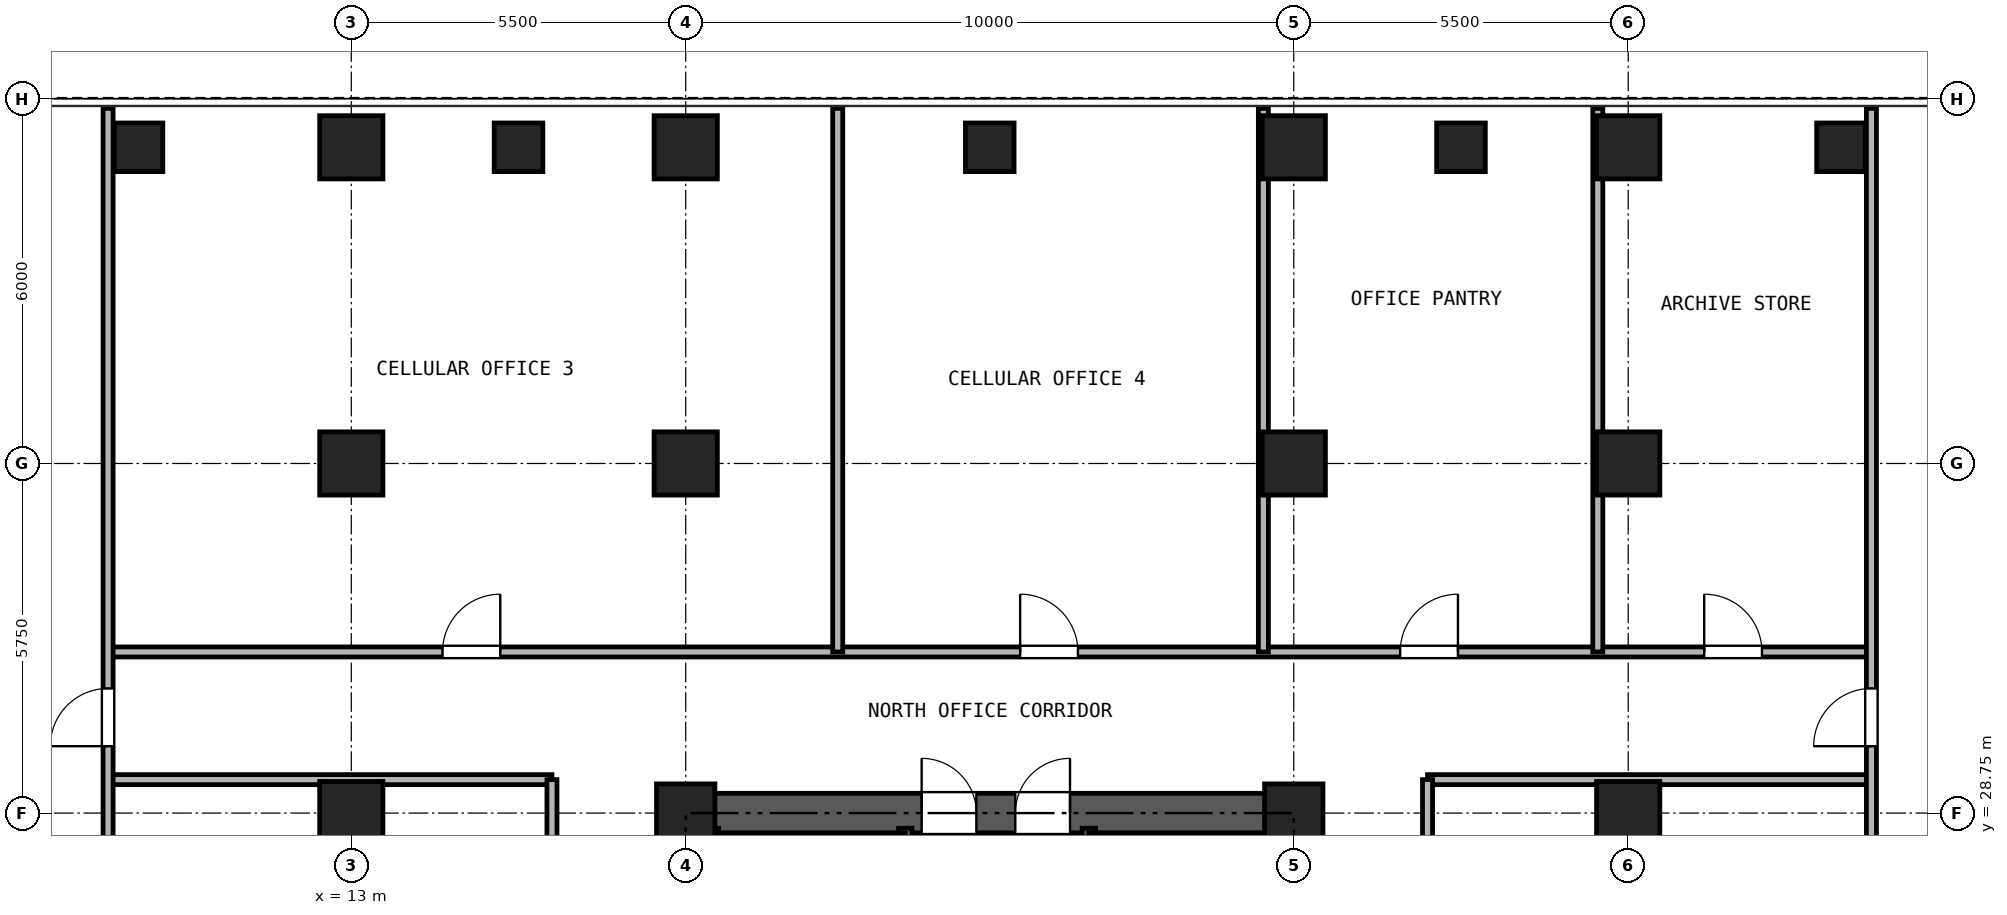
"""IFC4 building model, lengths in metres.
Left out: names, types, materials, properties, quantities, classifications, styles, units other than length and angle.
Written with IfcOpenShell. Run it as: python <this file> out.ifc"""

import sys

from ifc_helpers import new_model, si_unit, direction, frame, frame_2d, origin, origin_2d, place, context, subcontext, project, spatial, rectangle, hollow_rectangle, extrude, source, transform, mapped, element, fill, save


model = new_model("IFC4")
c1 = context("Model", 3, precision=1e-05, world=origin(), true_north=direction((0.0, 1.0)))
c2 = subcontext(c1, "Body", "Model", "MODEL_VIEW")
j1 = project(units=[si_unit("LENGTHUNIT", "METRE"), si_unit("PLANEANGLEUNIT", "RADIAN")], contexts=[c1])
p1 = place(None, origin())
s1 = spatial("IfcSite", under=j1, at=p1, CompositionType="ELEMENT")
p2 = place(p1, origin())
s2 = spatial("IfcBuilding", under=s1, at=p2, CompositionType="ELEMENT")
p3 = place(p2, frame((0.0, 0.0, 51.3)))
s3 = spatial("IfcBuildingStorey", under=s2, at=p3, CompositionType="ELEMENT", Elevation=51.3)
m1 = source(origin(), c2, "Body", "SweptSolid", [
    extrude(hollow_rectangle(XDim=1.04, YDim=1.04, WallThickness=0.065, at=origin_2d()), origin(), (0.0, 0.0, 1.0), 3.32),
])
for number, where, z_axis, x_axis in (
    (1, (13.0, 39.7, 0.0), (0.0, 0.0, 1.0), (1.0, 0.0, 0.0)),
    (2, (18.5, 39.7, 0.0), (0.0, 0.0, 1.0), (1.0, 0.0, 0.0)),
    (3, (28.5, 39.7, 0.0), (0.0, 0.0, 1.0), (1.0, 0.0, 0.0)),
    (4, (34.0, 39.7, 0.0), (0.0, 0.0, 1.0), (1.0, 0.0, 0.0)),
    (5, (13.0, 28.75, 0.0), (0.0, 0.0, 1.0), (1.0, 0.0, 0.0)),
    (6, (13.0, 34.5, 0.0), (0.0, 0.0, 1.0), (1.0, 0.0, 0.0)),
):
    element("IfcColumn", number, at=place(p3, frame(where, z_axis=z_axis, x_axis=x_axis)), inside=s3, PredefinedType="COLUMN", context=c2, shape_type="MappedRepresentation", body=[
        mapped(m1, transform((0.0, 0.0, 0.0), x_axis=(1.0, 0.0, 0.0), y_axis=(0.0, 1.0, 0.0), z_axis=(0.0, 0.0, 1.0), scale=1.0)),
    ])
m2 = source(origin(), c2, "Body", "SweptSolid", [
    extrude(hollow_rectangle(XDim=0.96, YDim=0.96, WallThickness=0.06, at=origin_2d()), origin(), (0.0, 0.0, 1.0), 3.32),
])
p4 = place(p3, frame((18.5, 28.75, 0.0), z_axis=(0.0, 0.0, 1.0), x_axis=(1.0, 0.0, 0.0)))
e7 = element("IfcColumn", 7, at=p4, inside=s3, PredefinedType="COLUMN", context=c2, shape_type="MappedRepresentation", body=[
    mapped(m2, transform((0.0, 0.0, 0.0), x_axis=(1.0, 0.0, 0.0), y_axis=(0.0, 1.0, 0.0), z_axis=(0.0, 0.0, 1.0), scale=1.0)),
])
p5 = place(p3, frame((18.5, 34.5, 0.0), z_axis=(0.0, 0.0, 1.0), x_axis=(1.0, 0.0, 0.0)))
e8 = element("IfcColumn", 8, at=p5, inside=s3, PredefinedType="COLUMN", context=c2, shape_type="MappedRepresentation", body=[
    mapped(m1, transform((0.0, 0.0, 0.0), x_axis=(1.0, 0.0, 0.0), y_axis=(0.0, 1.0, 0.0), z_axis=(0.0, 0.0, 1.0), scale=1.0)),
])
p6 = place(p3, frame((28.5, 28.75, 0.0), z_axis=(0.0, 0.0, 1.0), x_axis=(1.0, 0.0, 0.0)))
e9 = element("IfcColumn", 9, at=p6, inside=s3, PredefinedType="COLUMN", context=c2, shape_type="MappedRepresentation", body=[
    mapped(m2, transform((0.0, 0.0, 0.0), x_axis=(1.0, 0.0, 0.0), y_axis=(0.0, 1.0, 0.0), z_axis=(0.0, 0.0, 1.0), scale=1.0)),
])
for number, where, z_axis, x_axis in (
    (10, (28.5, 34.5, 0.0), (0.0, 0.0, 1.0), (1.0, 0.0, 0.0)),
    (11, (34.0, 28.75, 0.0), (0.0, 0.0, 1.0), (1.0, 0.0, 0.0)),
    (12, (34.0, 34.5, 0.0), (0.0, 0.0, 1.0), (1.0, 0.0, 0.0)),
):
    element("IfcColumn", number, at=place(p3, frame(where, z_axis=z_axis, x_axis=x_axis)), inside=s3, PredefinedType="COLUMN", context=c2, shape_type="MappedRepresentation", body=[
        mapped(m1, transform((0.0, 0.0, 0.0), x_axis=(1.0, 0.0, 0.0), y_axis=(0.0, 1.0, 0.0), z_axis=(0.0, 0.0, 1.0), scale=1.0)),
    ])
m3 = source(origin(), c2, "Body", "SweptSolid", [
    extrude(hollow_rectangle(XDim=0.8, YDim=0.8, WallThickness=0.045, at=origin_2d()), origin(), (0.0, 0.0, 1.0), 3.32),
])
for number, where, z_axis, x_axis in (
    (13, (9.5, 39.7, 0.0), (0.0, 0.0, 1.0), (1.0, 0.0, 0.0)),
    (14, (15.75, 39.7, 0.0), (0.0, 0.0, 1.0), (1.0, 0.0, 0.0)),
    (15, (23.5, 39.7, 0.0), (0.0, 0.0, 1.0), (1.0, 0.0, 0.0)),
    (16, (31.25, 39.7, 0.0), (0.0, 0.0, 1.0), (1.0, 0.0, 0.0)),
    (17, (37.5, 39.7, 0.0), (0.0, 0.0, 1.0), (1.0, 0.0, 0.0)),
):
    element("IfcColumn", number, at=place(p3, frame(where, z_axis=z_axis, x_axis=x_axis)), inside=s3, PredefinedType="COLUMN", context=c2, shape_type="MappedRepresentation", body=[
        mapped(m3, transform((0.0, 0.0, 0.0), x_axis=(1.0, 0.0, 0.0), y_axis=(0.0, 1.0, 0.0), z_axis=(0.0, 0.0, 1.0), scale=1.0)),
    ])
p7 = place(p3, frame((18.175, 28.75, 0.0), z_axis=(0.0, 0.0, 1.0), x_axis=(1.0, 0.0, 0.0)))
e18 = element("IfcWall", 18, at=p7, inside=s3, PredefinedType="SHEAR", context=c2, shape_type="SweptSolid", body=[
    extrude(rectangle(XDim=10.65, YDim=0.65, at=frame_2d((5.325, 0.0))), origin(), (0.0, 0.0, 1.0), 3.32),
])
p8 = place(p7, frame((4.205, 0.0, 0.0)))
e19 = element("IfcOpeningElement", 19, at=p8, cuts=e18, PredefinedType="OPENING", context=c2, shape_type="SweptSolid", body=[
    extrude(rectangle(XDim=0.9, YDim=2.05, at=frame_2d((0.45, 1.025))), frame((0.0, 0.335, 0.0), z_axis=(0.0, -1.0, 0.0), x_axis=(1.0, 0.0, 0.0)), (0.0, 0.0, 1.0), 0.67),
])
p9 = place(p7, frame((5.745, 0.0, 0.0)))
e20 = element("IfcOpeningElement", 20, at=p9, cuts=e18, PredefinedType="OPENING", context=c2, shape_type="SweptSolid", body=[
    extrude(rectangle(XDim=0.9, YDim=2.05, at=frame_2d((0.45, 1.025))), frame((0.0, 0.335, 0.0), z_axis=(0.0, -1.0, 0.0), x_axis=(1.0, 0.0, 0.0)), (0.0, 0.0, 1.0), 0.67),
])
p10 = place(p3, frame((18.5, 11.825, 0.0), z_axis=(0.0, 0.0, 1.0), x_axis=(0.0, 1.0, 0.0)))
e21 = element("IfcWall", 21, at=p10, inside=s3, PredefinedType="SHEAR", context=c2, shape_type="SweptSolid", body=[
    extrude(rectangle(XDim=16.6, YDim=0.65, at=frame_2d((8.3, 0.0))), origin(), (0.0, 0.0, 1.0), 3.32),
])
p11 = place(p10, frame((7.325, 0.0, 0.0)))
e22 = element("IfcOpeningElement", 22, at=p11, cuts=e21, PredefinedType="OPENING", context=c2, shape_type="SweptSolid", body=[
    extrude(rectangle(XDim=1.15, YDim=2.2, at=frame_2d((0.575, 1.1))), frame((0.0, 0.335, 0.0), z_axis=(0.0, -1.0, 0.0), x_axis=(1.0, 0.0, 0.0)), (0.0, 0.0, 1.0), 0.67),
])
p12 = place(p3, frame((28.5, 11.825, 0.0), z_axis=(0.0, 0.0, 1.0), x_axis=(0.0, 1.0, 0.0)))
e23 = element("IfcWall", 23, at=p12, inside=s3, PredefinedType="SHEAR", context=c2, shape_type="SweptSolid", body=[
    extrude(rectangle(XDim=16.6, YDim=0.65, at=frame_2d((8.3, 0.0))), origin(), (0.0, 0.0, 1.0), 3.32),
])
p13 = place(p12, frame((7.325, 0.0, 0.0)))
e24 = element("IfcOpeningElement", 24, at=p13, cuts=e23, PredefinedType="OPENING", context=c2, shape_type="SweptSolid", body=[
    extrude(rectangle(XDim=1.15, YDim=2.2, at=frame_2d((0.575, 1.1))), frame((0.0, 0.335, 0.0), z_axis=(0.0, -1.0, 0.0), x_axis=(1.0, 0.0, 0.0)), (0.0, 0.0, 1.0), 0.67),
])
for number, where, z_axis, x_axis in (
    (25, (18.93, 21.39, 0.0), (0.0, 0.0, 1.0), (0.0, 1.0, 0.0)),
    (26, (22.11, 21.39, 0.0), (0.0, 0.0, 1.0), (0.0, 1.0, 0.0)),
    (27, (25.13, 21.39, 0.0), (0.0, 0.0, 1.0), (0.0, 1.0, 0.0)),
):
    element("IfcWall", number, at=place(p3, frame(where, z_axis=z_axis, x_axis=x_axis)), inside=s3, PredefinedType="SOLIDWALL", context=c2, shape_type="SweptSolid", body=[
        extrude(rectangle(XDim=7.11, YDim=0.22, at=frame_2d((3.555, 0.0))), origin(), (0.0, 0.0, 1.0), 3.32),
    ])
p14 = place(p3, frame((18.835, 28.335, 0.0), z_axis=(0.0, 0.0, 1.0), x_axis=(1.0, 0.0, 0.0)))
e28 = element("IfcWall", 28, at=p14, inside=s3, PredefinedType="PARTITIONING", context=c2, shape_type="SweptSolid", body=[
    extrude(rectangle(XDim=3.275, YDim=0.165, at=frame_2d((1.638, 0.0))), origin(), (0.0, 0.0, 1.0), 3.32),
])
p15 = place(p3, frame((25.13, 28.335, 0.0), z_axis=(0.0, 0.0, 1.0), x_axis=(1.0, 0.0, 0.0)))
e29 = element("IfcWall", 29, at=p15, inside=s3, PredefinedType="PARTITIONING", context=c2, shape_type="SweptSolid", body=[
    extrude(rectangle(XDim=3.035, YDim=0.165, at=frame_2d((1.518, 0.0))), origin(), (0.0, 0.0, 1.0), 3.32),
])
p16 = place(p3, frame((23.62, 24.4, 0.0), z_axis=(0.0, 0.0, 1.0), x_axis=(0.0, 1.0, 0.0)))
e30 = element("IfcWall", 30, at=p16, inside=s3, PredefinedType="PARTITIONING", context=c2, shape_type="SweptSolid", body=[
    extrude(rectangle(XDim=4.015, YDim=0.165, at=frame_2d((2.008, 0.0))), origin(), (0.0, 0.0, 1.0), 3.32),
])
p17 = place(p3, frame((9.0, 31.4, 0.0), z_axis=(0.0, 0.0, 1.0), x_axis=(1.0, 0.0, 0.0)))
e31 = element("IfcWall", 31, at=p17, inside=s3, PredefinedType="PARTITIONING", context=c2, shape_type="SweptSolid", body=[
    extrude(rectangle(XDim=29.0, YDim=0.165, at=frame_2d((14.5, 0.0))), origin(), (0.0, 0.0, 1.0), 2.898),
])
p18 = place(p17, frame((5.5, 0.0, 0.0)))
e32 = element("IfcOpeningElement", 32, at=p18, cuts=e31, PredefinedType="OPENING", context=c2, shape_type="SweptSolid", body=[
    extrude(rectangle(XDim=0.95, YDim=2.15, at=frame_2d((0.475, 1.075))), frame((0.0, 0.093, 0.0), z_axis=(0.0, -1.0, 0.0), x_axis=(1.0, 0.0, 0.0)), (0.0, 0.0, 1.0), 0.185),
])
p19 = place(p17, frame((15.0, 0.0, 0.0)))
e33 = element("IfcOpeningElement", 33, at=p19, cuts=e31, PredefinedType="OPENING", context=c2, shape_type="SweptSolid", body=[
    extrude(rectangle(XDim=0.95, YDim=2.15, at=frame_2d((0.475, 1.075))), frame((0.0, 0.093, 0.0), z_axis=(0.0, -1.0, 0.0), x_axis=(1.0, 0.0, 0.0)), (0.0, 0.0, 1.0), 0.185),
])
p20 = place(p17, frame((21.25, 0.0, 0.0)))
e34 = element("IfcOpeningElement", 34, at=p20, cuts=e31, PredefinedType="OPENING", context=c2, shape_type="SweptSolid", body=[
    extrude(rectangle(XDim=0.95, YDim=2.15, at=frame_2d((0.475, 1.075))), frame((0.0, 0.093, 0.0), z_axis=(0.0, -1.0, 0.0), x_axis=(1.0, 0.0, 0.0)), (0.0, 0.0, 1.0), 0.185),
])
p21 = place(p17, frame((26.25, 0.0, 0.0)))
e35 = element("IfcOpeningElement", 35, at=p21, cuts=e31, PredefinedType="OPENING", context=c2, shape_type="SweptSolid", body=[
    extrude(rectangle(XDim=0.95, YDim=2.15, at=frame_2d((0.475, 1.075))), frame((0.0, 0.093, 0.0), z_axis=(0.0, -1.0, 0.0), x_axis=(1.0, 0.0, 0.0)), (0.0, 0.0, 1.0), 0.185),
])
for number, where, z_axis, x_axis in (
    (36, (9.0, 29.3, 0.0), (0.0, 0.0, 1.0), (1.0, 0.0, 0.0)),
    (37, (30.7, 29.3, 0.0), (0.0, 0.0, 1.0), (1.0, 0.0, 0.0)),
):
    element("IfcWall", number, at=place(p3, frame(where, z_axis=z_axis, x_axis=x_axis)), inside=s3, PredefinedType="PARTITIONING", context=c2, shape_type="SweptSolid", body=[
        extrude(rectangle(XDim=7.3, YDim=0.165, at=frame_2d((3.65, 0.0))), origin(), (0.0, 0.0, 1.0), 3.32),
    ])
p22 = place(p3, frame((16.3, 11.05, 0.0), z_axis=(0.0, 0.0, 1.0), x_axis=(0.0, 1.0, 0.0)))
e38 = element("IfcWall", 38, at=p22, inside=s3, PredefinedType="PARTITIONING", context=c2, shape_type="SweptSolid", body=[
    extrude(rectangle(XDim=18.25, YDim=0.165, at=frame_2d((9.125, 0.0))), origin(), (0.0, 0.0, 1.0), 3.32),
])
p23 = place(p22, frame((5.409, 0.0, 0.0)))
e39 = element("IfcOpeningElement", 39, at=p23, cuts=e38, PredefinedType="OPENING", context=c2, shape_type="SweptSolid", body=[
    extrude(rectangle(XDim=0.95, YDim=2.15, at=frame_2d((0.475, 1.075))), frame((0.0, 0.093, 0.0), z_axis=(0.0, -1.0, 0.0), x_axis=(1.0, 0.0, 0.0)), (0.0, 0.0, 1.0), 0.185),
])
p24 = place(p22, frame((14.534, 0.0, 0.0)))
e40 = element("IfcOpeningElement", 40, at=p24, cuts=e38, PredefinedType="OPENING", context=c2, shape_type="SweptSolid", body=[
    extrude(rectangle(XDim=0.95, YDim=2.15, at=frame_2d((0.475, 1.075))), frame((0.0, 0.093, 0.0), z_axis=(0.0, -1.0, 0.0), x_axis=(1.0, 0.0, 0.0)), (0.0, 0.0, 1.0), 0.185),
])
p25 = place(p3, frame((30.7, 11.05, 0.0), z_axis=(0.0, 0.0, 1.0), x_axis=(0.0, 1.0, 0.0)))
e41 = element("IfcWall", 41, at=p25, inside=s3, PredefinedType="PARTITIONING", context=c2, shape_type="SweptSolid", body=[
    extrude(rectangle(XDim=18.25, YDim=0.165, at=frame_2d((9.125, 0.0))), origin(), (0.0, 0.0, 1.0), 3.32),
])
p26 = place(p25, frame((8.625, 0.0, 0.0)))
e42 = element("IfcOpeningElement", 42, at=p26, cuts=e41, PredefinedType="OPENING", context=c2, shape_type="SweptSolid", body=[
    extrude(rectangle(XDim=0.95, YDim=2.15, at=frame_2d((0.475, 1.075))), frame((0.0, 0.093, 0.0), z_axis=(0.0, -1.0, 0.0), x_axis=(1.0, 0.0, 0.0)), (0.0, 0.0, 1.0), 0.185),
])
p27 = place(p3, frame((9.0, 0.16, 0.0), z_axis=(0.0, 0.0, 1.0), x_axis=(0.0, 1.0, 0.0)))
e43 = element("IfcWall", 43, at=p27, inside=s3, PredefinedType="PARTITIONING", context=c2, shape_type="SweptSolid", body=[
    extrude(rectangle(XDim=40.18, YDim=0.165, at=frame_2d((20.09, 0.0))), origin(), (0.0, 0.0, 1.0), 3.32),
])
p28 = place(p27, frame((9.34, 0.0, 0.0)))
e44 = element("IfcOpeningElement", 44, at=p28, cuts=e43, PredefinedType="OPENING", context=c2, shape_type="SweptSolid", body=[
    extrude(rectangle(XDim=0.95, YDim=2.15, at=frame_2d((0.475, 1.075))), frame((0.0, 0.093, 0.0), z_axis=(0.0, -1.0, 0.0), x_axis=(1.0, 0.0, 0.0)), (0.0, 0.0, 1.0), 0.185),
])
p29 = place(p27, frame((29.69, 0.0, 0.0)))
e45 = element("IfcOpeningElement", 45, at=p29, cuts=e43, PredefinedType="OPENING", context=c2, shape_type="SweptSolid", body=[
    extrude(rectangle(XDim=0.95, YDim=2.15, at=frame_2d((0.475, 1.075))), frame((0.0, 0.093, 0.0), z_axis=(0.0, -1.0, 0.0), x_axis=(1.0, 0.0, 0.0)), (0.0, 0.0, 1.0), 0.185),
])
p30 = place(p3, frame((38.0, 0.16, 0.0), z_axis=(0.0, 0.0, 1.0), x_axis=(0.0, 1.0, 0.0)))
e46 = element("IfcWall", 46, at=p30, inside=s3, PredefinedType="PARTITIONING", context=c2, shape_type="SweptSolid", body=[
    extrude(rectangle(XDim=40.18, YDim=0.165, at=frame_2d((20.09, 0.0))), origin(), (0.0, 0.0, 1.0), 3.32),
])
p31 = place(p30, frame((9.34, 0.0, 0.0)))
e47 = element("IfcOpeningElement", 47, at=p31, cuts=e46, PredefinedType="OPENING", context=c2, shape_type="SweptSolid", body=[
    extrude(rectangle(XDim=0.95, YDim=2.15, at=frame_2d((0.475, 1.075))), frame((0.0, 0.093, 0.0), z_axis=(0.0, -1.0, 0.0), x_axis=(1.0, 0.0, 0.0)), (0.0, 0.0, 1.0), 0.185),
])
p32 = place(p30, frame((29.69, 0.0, 0.0)))
e48 = element("IfcOpeningElement", 48, at=p32, cuts=e46, PredefinedType="OPENING", context=c2, shape_type="SweptSolid", body=[
    extrude(rectangle(XDim=0.95, YDim=2.15, at=frame_2d((0.475, 1.075))), frame((0.0, 0.093, 0.0), z_axis=(0.0, -1.0, 0.0), x_axis=(1.0, 0.0, 0.0)), (0.0, 0.0, 1.0), 0.185),
])
for number, where, z_axis, x_axis in (
    (49, (21.0, 31.4, 0.0), (0.0, 0.0, 1.0), (0.0, 1.0, 0.0)),
    (50, (28.0, 31.4, 0.0), (0.0, 0.0, 1.0), (0.0, 1.0, 0.0)),
    (51, (33.5, 31.4, 0.0), (0.0, 0.0, 1.0), (0.0, 1.0, 0.0)),
):
    element("IfcWall", number, at=place(p3, frame(where, z_axis=z_axis, x_axis=x_axis)), inside=s3, PredefinedType="PARTITIONING", context=c2, shape_type="SweptSolid", body=[
        extrude(rectangle(XDim=8.94, YDim=0.165, at=frame_2d((4.47, 0.0))), origin(), (0.0, 0.0, 1.0), 3.32),
    ])
p33 = place(p8, origin())
e52 = element("IfcDoor", 52, at=p33, inside=s3, OperationType="SINGLE_SWING_LEFT", PredefinedType="DOOR", context=c2, shape_type="SweptSolid", body=[
    extrude(rectangle(XDim=0.9, YDim=2.05, at=frame_2d((0.45, 1.025))), frame((0.0, 0.025, 0.0), z_axis=(0.0, -1.0, 0.0), x_axis=(1.0, 0.0, 0.0)), (0.0, 0.0, 1.0), 0.05),
])
fill(e19, e52)
p34 = place(p9, origin())
e53 = element("IfcDoor", 53, at=p34, inside=s3, OperationType="SINGLE_SWING_RIGHT", PredefinedType="DOOR", context=c2, shape_type="SweptSolid", body=[
    extrude(rectangle(XDim=0.9, YDim=2.05, at=frame_2d((0.45, 1.025))), frame((0.0, 0.025, 0.0), z_axis=(0.0, -1.0, 0.0), x_axis=(1.0, 0.0, 0.0)), (0.0, 0.0, 1.0), 0.05),
])
fill(e20, e53)
p35 = place(p18, origin())
e54 = element("IfcDoor", 54, at=p35, inside=s3, OperationType="SINGLE_SWING_RIGHT", PredefinedType="DOOR", context=c2, shape_type="SweptSolid", body=[
    extrude(rectangle(XDim=0.95, YDim=2.15, at=frame_2d((0.475, 1.075))), frame((0.0, 0.025, 0.0), z_axis=(0.0, -1.0, 0.0), x_axis=(1.0, 0.0, 0.0)), (0.0, 0.0, 1.0), 0.05),
])
fill(e32, e54)
p36 = place(p19, origin())
e55 = element("IfcDoor", 55, at=p36, inside=s3, OperationType="SINGLE_SWING_LEFT", PredefinedType="DOOR", context=c2, shape_type="SweptSolid", body=[
    extrude(rectangle(XDim=0.95, YDim=2.15, at=frame_2d((0.475, 1.075))), frame((0.0, 0.025, 0.0), z_axis=(0.0, -1.0, 0.0), x_axis=(1.0, 0.0, 0.0)), (0.0, 0.0, 1.0), 0.05),
])
fill(e33, e55)
p37 = place(p20, origin())
e56 = element("IfcDoor", 56, at=p37, inside=s3, OperationType="SINGLE_SWING_RIGHT", PredefinedType="DOOR", context=c2, shape_type="SweptSolid", body=[
    extrude(rectangle(XDim=0.95, YDim=2.15, at=frame_2d((0.475, 1.075))), frame((0.0, 0.025, 0.0), z_axis=(0.0, -1.0, 0.0), x_axis=(1.0, 0.0, 0.0)), (0.0, 0.0, 1.0), 0.05),
])
fill(e34, e56)
p38 = place(p21, origin())
e57 = element("IfcDoor", 57, at=p38, inside=s3, OperationType="SINGLE_SWING_LEFT", PredefinedType="DOOR", context=c2, shape_type="SweptSolid", body=[
    extrude(rectangle(XDim=0.95, YDim=2.15, at=frame_2d((0.475, 1.075))), frame((0.0, 0.025, 0.0), z_axis=(0.0, -1.0, 0.0), x_axis=(1.0, 0.0, 0.0)), (0.0, 0.0, 1.0), 0.05),
])
fill(e35, e57)
p39 = place(p29, frame((0.95, 0.0, 0.0), z_axis=(0.0, 0.0, 1.0), x_axis=(-1.0, 0.0, 0.0)))
e58 = element("IfcDoor", 58, at=p39, inside=s3, OperationType="SINGLE_SWING_LEFT", PredefinedType="DOOR", context=c2, shape_type="SweptSolid", body=[
    extrude(rectangle(XDim=0.95, YDim=2.15, at=frame_2d((0.475, 1.075))), frame((0.0, 0.025, 0.0), z_axis=(0.0, -1.0, 0.0), x_axis=(1.0, 0.0, 0.0)), (0.0, 0.0, 1.0), 0.05),
])
fill(e45, e58)
p40 = place(p32, origin())
e59 = element("IfcDoor", 59, at=p40, inside=s3, OperationType="SINGLE_SWING_LEFT", PredefinedType="DOOR", context=c2, shape_type="SweptSolid", body=[
    extrude(rectangle(XDim=0.95, YDim=2.15, at=frame_2d((0.475, 1.075))), frame((0.0, 0.025, 0.0), z_axis=(0.0, -1.0, 0.0), x_axis=(1.0, 0.0, 0.0)), (0.0, 0.0, 1.0), 0.05),
])
fill(e48, e59)
save(model, sys.argv[1])
